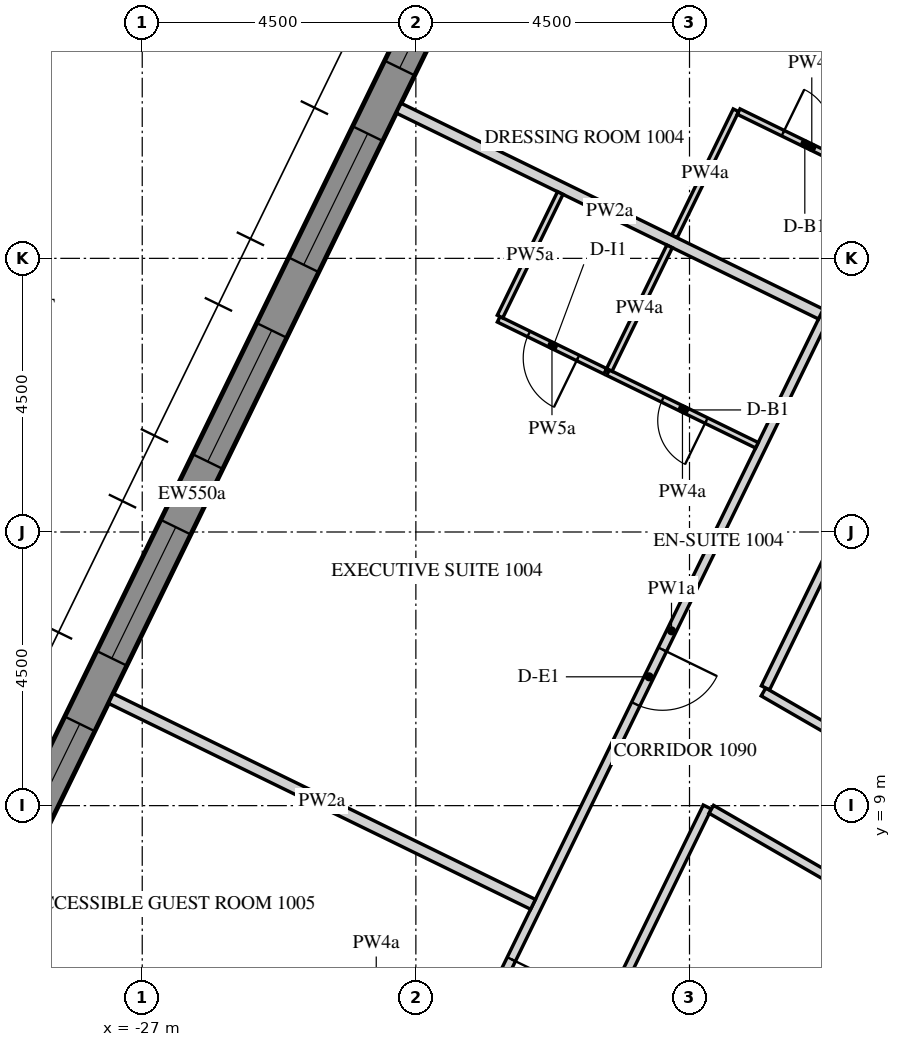
"""IFC4 building model, lengths in metres.
Left out: names, types, materials, properties, quantities, classifications, styles, units other than length and angle.
Written with IfcOpenShell. Run it as: python <this file> out.ifc"""

import sys

from ifc_helpers import new_model, si_unit, direction, frame, frame_2d, origin, place, context, subcontext, project, spatial, polyline, rectangle, outline, extrude, element, fill, save


model = new_model("IFC4")
c1 = context("Model", 3, precision=1e-05, world=origin(), true_north=direction((0.0, 1.0)))
c2 = subcontext(c1, "Body", "Model", "MODEL_VIEW")
j1 = project(units=[si_unit("LENGTHUNIT", "METRE"), si_unit("PLANEANGLEUNIT", "RADIAN")], contexts=[c1])
p1 = place(None, origin())
s1 = spatial("IfcSite", under=j1, at=p1, CompositionType="ELEMENT")
p2 = place(p1, origin())
s2 = spatial("IfcBuilding", under=s1, at=p2, CompositionType="ELEMENT")
p3 = place(p2, frame((0.0, 0.0, 142.8)))
s3 = spatial("IfcBuildingStorey", under=s2, at=p3, CompositionType="ELEMENT", Elevation=142.8)
p4 = place(p3, frame((-19.595, 27.633, -0.15), z_axis=(0.0, 0.0, 1.0), x_axis=(-0.438368285794, -0.898795441694, 0.0)))
e1 = element("IfcWall", 1, at=p4, inside=s3, PredefinedType="SOLIDWALL", context=c2, shape_type="SweptSolid", body=[
    extrude(outline(polyline([(-0.026, -0.275), (30.093, -0.275), (30.048, 0.275), (0.026, 0.275), (-0.026, -0.275)])), origin(), (0.0, 0.0, 1.0), 3.75),
])
p5 = place(p4, frame((1.236, 0.0, 1.05)))
e2 = element("IfcOpeningElement", 2, at=p5, cuts=e1, PredefinedType="OPENING", context=c2, shape_type="SweptSolid", body=[
    extrude(rectangle(XDim=2.4, YDim=2.4, at=frame_2d((1.2, 1.2))), frame((0.0, 0.285, 0.0), z_axis=(0.0, -1.0, 0.0), x_axis=(1.0, 0.0, 0.0)), (0.0, 0.0, 1.0), 0.57),
])
p6 = place(p4, frame((4.835, 0.0, 1.05)))
e3 = element("IfcOpeningElement", 3, at=p6, cuts=e1, PredefinedType="OPENING", context=c2, shape_type="SweptSolid", body=[
    extrude(rectangle(XDim=2.4, YDim=2.4, at=frame_2d((1.2, 1.2))), frame((0.0, 0.285, 0.0), z_axis=(0.0, -1.0, 0.0), x_axis=(1.0, 0.0, 0.0)), (0.0, 0.0, 1.0), 0.57),
])
p7 = place(p4, frame((8.436, 0.0, 1.05)))
e4 = element("IfcOpeningElement", 4, at=p7, cuts=e1, PredefinedType="OPENING", context=c2, shape_type="SweptSolid", body=[
    extrude(rectangle(XDim=2.4, YDim=2.4, at=frame_2d((1.2, 1.2))), frame((0.0, 0.285, 0.0), z_axis=(0.0, -1.0, 0.0), x_axis=(1.0, 0.0, 0.0)), (0.0, 0.0, 1.0), 0.57),
])
p8 = place(p4, frame((12.035, 0.0, 1.05)))
e5 = element("IfcOpeningElement", 5, at=p8, cuts=e1, PredefinedType="OPENING", context=c2, shape_type="SweptSolid", body=[
    extrude(rectangle(XDim=2.4, YDim=2.4, at=frame_2d((1.2, 1.2))), frame((0.0, 0.285, 0.0), z_axis=(0.0, -1.0, 0.0), x_axis=(1.0, 0.0, 0.0)), (0.0, 0.0, 1.0), 0.57),
])
p9 = place(p4, frame((15.635, 0.0, 1.05)))
e6 = element("IfcOpeningElement", 6, at=p9, cuts=e1, PredefinedType="OPENING", context=c2, shape_type="SweptSolid", body=[
    extrude(rectangle(XDim=2.4, YDim=2.4, at=frame_2d((1.2, 1.2))), frame((0.0, 0.285, 0.0), z_axis=(0.0, -1.0, 0.0), x_axis=(1.0, 0.0, 0.0)), (0.0, 0.0, 1.0), 0.57),
])
p10 = place(p4, frame((19.236, 0.0, 1.05)))
e7 = element("IfcOpeningElement", 7, at=p10, cuts=e1, PredefinedType="OPENING", context=c2, shape_type="SweptSolid", body=[
    extrude(rectangle(XDim=2.4, YDim=2.4, at=frame_2d((1.2, 1.2))), frame((0.0, 0.285, 0.0), z_axis=(0.0, -1.0, 0.0), x_axis=(1.0, 0.0, 0.0)), (0.0, 0.0, 1.0), 0.57),
])
p11 = place(p4, frame((22.835, 0.0, 1.05)))
e8 = element("IfcOpeningElement", 8, at=p11, cuts=e1, PredefinedType="OPENING", context=c2, shape_type="SweptSolid", body=[
    extrude(rectangle(XDim=2.4, YDim=2.4, at=frame_2d((1.2, 1.2))), frame((0.0, 0.285, 0.0), z_axis=(0.0, -1.0, 0.0), x_axis=(1.0, 0.0, 0.0)), (0.0, 0.0, 1.0), 0.57),
])
p12 = place(p4, frame((26.436, 0.0, 1.05)))
e9 = element("IfcOpeningElement", 9, at=p12, cuts=e1, PredefinedType="OPENING", context=c2, shape_type="SweptSolid", body=[
    extrude(rectangle(XDim=2.4, YDim=2.4, at=frame_2d((1.2, 1.2))), frame((0.0, 0.285, 0.0), z_axis=(0.0, -1.0, 0.0), x_axis=(1.0, 0.0, 0.0)), (0.0, 0.0, 1.0), 0.57),
])
p13 = place(p3, frame((-7.91, 13.7, -0.15), z_axis=(0.0, 0.0, 1.0), x_axis=(-0.499999880136, -0.866025472988, 0.0)))
e10 = element("IfcWall", 10, at=p13, inside=s3, PredefinedType="SHEAR", context=c2, shape_type="SweptSolid", body=[
    extrude(outline(polyline([(-0.173, -0.3), (15.993, -0.3), (15.646, 0.3), (0.173, 0.3), (-0.173, -0.3)])), origin(), (0.0, 0.0, 1.0), 3.75),
])
p14 = place(p13, frame((7.039, 0.0, 0.15)))
e11 = element("IfcOpeningElement", 11, at=p14, cuts=e10, PredefinedType="OPENING", context=c2, shape_type="SweptSolid", body=[
    extrude(rectangle(XDim=1.8, YDim=2.4, at=frame_2d((0.9, 1.2))), frame((0.0, 0.31, 0.0), z_axis=(0.0, -1.0, 0.0), x_axis=(1.0, 0.0, 0.0)), (0.0, 0.0, 1.0), 0.62),
])
p15 = place(p3, frame((-13.565, 21.575, 0.0), z_axis=(0.0, 0.0, 1.0), x_axis=(-0.438378393111, -0.898790511996, 0.0)))
e12 = element("IfcWall", 12, at=p15, inside=s3, PredefinedType="PARTITIONING", context=c2, shape_type="SweptSolid", body=[
    extrude(rectangle(XDim=21.584, YDim=0.15, at=frame_2d((10.792, 0.0))), origin(), (0.0, 0.0, 1.0), 2.838),
])
p16 = place(p15, frame((0.775, 0.0, 0.0)))
e13 = element("IfcOpeningElement", 13, at=p16, cuts=e12, PredefinedType="OPENING", context=c2, shape_type="SweptSolid", body=[
    extrude(rectangle(XDim=1.0, YDim=2.1, at=frame_2d((0.5, 1.05))), frame((0.0, 0.085, 0.0), z_axis=(0.0, -1.0, 0.0), x_axis=(1.0, 0.0, 0.0)), (0.0, 0.0, 1.0), 0.17),
])
p17 = place(p15, frame((11.134, 0.0, 0.0)))
e14 = element("IfcOpeningElement", 14, at=p17, cuts=e12, PredefinedType="OPENING", context=c2, shape_type="SweptSolid", body=[
    extrude(rectangle(XDim=1.0, YDim=2.1, at=frame_2d((0.5, 1.05))), frame((0.0, 0.085, 0.0), z_axis=(0.0, -1.0, 0.0), x_axis=(1.0, 0.0, 0.0)), (0.0, 0.0, 1.0), 0.17),
])
p18 = place(p15, frame((16.801, 0.0, 0.0)))
e15 = element("IfcOpeningElement", 15, at=p18, cuts=e12, PredefinedType="OPENING", context=c2, shape_type="SweptSolid", body=[
    extrude(rectangle(XDim=1.0, YDim=2.1, at=frame_2d((0.5, 1.05))), frame((0.0, 0.085, 0.0), z_axis=(0.0, -1.0, 0.0), x_axis=(1.0, 0.0, 0.0)), (0.0, 0.0, 1.0), 0.17),
])
p19 = place(p3, frame((-11.614, 7.884, 0.0), z_axis=(0.0, 0.0, 1.0), x_axis=(-0.866017375886, 0.50001390447, 0.0)))
e16 = element("IfcWall", 16, at=p19, inside=s3, PredefinedType="PARTITIONING", context=c2, shape_type="SweptSolid", body=[
    extrude(rectangle(XDim=5.97, YDim=0.15, at=frame_2d((2.985, 0.0))), origin(), (0.0, 0.0, 1.0), 2.838),
])
p20 = place(p3, frame((-16.751, 10.937, 0.0), z_axis=(0.0, 0.0, 1.0), x_axis=(0.438378523504, 0.898790448397, 0.0)))
e17 = element("IfcWall", 17, at=p20, inside=s3, PredefinedType="PARTITIONING", context=c2, shape_type="SweptSolid", body=[
    extrude(rectangle(XDim=9.917, YDim=0.15, at=frame_2d((4.958, 0.0))), origin(), (0.0, 0.0, 1.0), 2.838),
])
p21 = place(p3, frame((-21.885, 0.41, 0.0), z_axis=(0.0, 0.0, 1.0), x_axis=(0.43837064471, 0.898794291179, 0.0)))
e18 = element("IfcWall", 18, at=p21, inside=s3, PredefinedType="PARTITIONING", context=c2, shape_type="SweptSolid", body=[
    extrude(rectangle(XDim=9.532, YDim=0.15, at=frame_2d((4.766, 0.0))), origin(), (0.0, 0.0, 1.0), 2.838),
])
p22 = place(p21, frame((4.316, 0.0, 0.0)))
e19 = element("IfcOpeningElement", 19, at=p22, cuts=e18, PredefinedType="OPENING", context=c2, shape_type="SweptSolid", body=[
    extrude(rectangle(XDim=0.9, YDim=2.1, at=frame_2d((0.45, 1.05))), frame((0.0, 0.085, 0.0), z_axis=(0.0, -1.0, 0.0), x_axis=(1.0, 0.0, 0.0)), (0.0, 0.0, 1.0), 0.17),
])
p23 = place(p3, frame((-17.642, 8.94, 0.0), z_axis=(0.0, 0.0, 1.0), x_axis=(0.866017948234, -0.500012913169, 0.0)))
e20 = element("IfcWall", 20, at=p23, inside=s3, PredefinedType="PARTITIONING", context=c2, shape_type="SweptSolid", body=[
    extrude(rectangle(XDim=5.748, YDim=0.15, at=frame_2d((2.874, 0.0))), origin(), (0.0, 0.0, 1.0), 2.838),
])
p24 = place(p3, frame((-18.249, 18.359, 0.0), z_axis=(0.0, 0.0, 1.0), x_axis=(0.438313261974, 0.898822276303, 0.0)))
e21 = element("IfcWall", 21, at=p24, inside=s3, PredefinedType="PARTITIONING", context=c2, shape_type="SweptSolid", body=[
    extrude(rectangle(XDim=2.31, YDim=0.1, at=frame_2d((1.155, 0.0))), origin(), (0.0, 0.0, 1.0), 2.838),
])
p25 = place(p3, frame((-17.191, 20.413, 0.0), z_axis=(0.0, 0.0, 1.0), x_axis=(0.898800897694, -0.438357099068, 0.0)))
e22 = element("IfcWall", 22, at=p25, inside=s3, PredefinedType="PARTITIONING", context=c2, shape_type="SweptSolid", body=[
    extrude(rectangle(XDim=2.675, YDim=0.1, at=frame_2d((1.337, 0.0))), origin(), (0.0, 0.0, 1.0), 2.838),
])
p26 = place(p25, frame((0.81, 0.0, 0.0)))
e23 = element("IfcOpeningElement", 23, at=p26, cuts=e22, PredefinedType="OPENING", context=c2, shape_type="SweptSolid", body=[
    extrude(rectangle(XDim=0.8, YDim=2.1, at=frame_2d((0.4, 1.05))), frame((0.0, 0.06, 0.0), z_axis=(0.0, -1.0, 0.0), x_axis=(1.0, 0.0, 0.0)), (0.0, 0.0, 1.0), 0.12),
])
p27 = place(p3, frame((-22.782, 20.47, 0.0), z_axis=(0.0, 0.0, 1.0), x_axis=(0.898789402655, -0.438380667542, 0.0)))
e24 = element("IfcWall", 24, at=p27, inside=s3, PredefinedType="PARTITIONING", context=c2, shape_type="SweptSolid", body=[
    extrude(rectangle(XDim=7.725, YDim=0.18, at=frame_2d((3.862, 0.0))), origin(), (0.0, 0.0, 1.0), 2.838),
])
p28 = place(p3, frame((-16.891, 14.926, 0.0), z_axis=(0.0, 0.0, 1.0), x_axis=(-0.898791692788, 0.43837597217, 0.0)))
e25 = element("IfcWall", 25, at=p28, inside=s3, PredefinedType="PARTITIONING", context=c2, shape_type="SweptSolid", body=[
    extrude(rectangle(XDim=2.725, YDim=0.1, at=frame_2d((1.363, 0.0))), origin(), (0.0, 0.0, 1.0), 2.838),
])
p29 = place(p28, frame((0.925, 0.0, 0.0)))
e26 = element("IfcOpeningElement", 26, at=p29, cuts=e25, PredefinedType="OPENING", context=c2, shape_type="SweptSolid", body=[
    extrude(rectangle(XDim=0.8, YDim=2.1, at=frame_2d((0.4, 1.05))), frame((0.0, 0.06, 0.0), z_axis=(0.0, -1.0, 0.0), x_axis=(1.0, 0.0, 0.0)), (0.0, 0.0, 1.0), 0.12),
])
p30 = place(p3, frame((-19.385, 16.143, 0.0), z_axis=(0.0, 0.0, 1.0), x_axis=(-0.898815368173, 0.438327427772, 0.0)))
e27 = element("IfcWall", 27, at=p30, inside=s3, PredefinedType="PARTITIONING", context=c2, shape_type="SweptSolid", body=[
    extrude(rectangle(XDim=1.95, YDim=0.1, at=frame_2d((0.975, 0.0))), origin(), (0.0, 0.0, 1.0), 2.838),
])
p31 = place(p30, frame((0.5, 0.0, 0.0)))
e28 = element("IfcOpeningElement", 28, at=p31, cuts=e27, PredefinedType="OPENING", context=c2, shape_type="SweptSolid", body=[
    extrude(rectangle(XDim=0.9, YDim=2.1, at=frame_2d((0.45, 1.05))), frame((0.0, 0.06, 0.0), z_axis=(0.0, -1.0, 0.0), x_axis=(1.0, 0.0, 0.0)), (0.0, 0.0, 1.0), 0.12),
])
p32 = place(p3, frame((-21.116, 17.042, 0.0), z_axis=(0.0, 0.0, 1.0), x_axis=(0.438334246956, 0.898812042613, 0.0)))
e29 = element("IfcWall", 29, at=p32, inside=s3, PredefinedType="PARTITIONING", context=c2, shape_type="SweptSolid", body=[
    extrude(rectangle(XDim=2.26, YDim=0.1, at=frame_2d((1.13, 0.0))), origin(), (0.0, 0.0, 1.0), 2.838),
])
p33 = place(p3, frame((-27.517, 10.763, 0.0), z_axis=(0.0, 0.0, 1.0), x_axis=(0.898789402655, -0.438380667542, 0.0)))
e30 = element("IfcWall", 30, at=p33, inside=s3, PredefinedType="PARTITIONING", context=c2, shape_type="SweptSolid", body=[
    extrude(rectangle(XDim=7.725, YDim=0.18, at=frame_2d((3.862, 0.0))), origin(), (0.0, 0.0, 1.0), 2.838),
])
p34 = place(p3, frame((-18.328, 18.197, 0.0), z_axis=(0.0, 0.0, 1.0), x_axis=(-0.438376807268, -0.898791285477, 0.0)))
e31 = element("IfcWall", 31, at=p34, inside=s3, PredefinedType="PARTITIONING", context=c2, shape_type="SweptSolid", body=[
    extrude(rectangle(XDim=2.26, YDim=0.1, at=frame_2d((1.13, 0.0))), origin(), (0.0, 0.0, 1.0), 2.838),
])
p35 = place(p6, frame((0.0, 0.205, 0.0)))
e32 = element("IfcWindow", 32, at=p35, inside=s3, PartitioningType="DOUBLE_PANEL_VERTICAL", PredefinedType="WINDOW", context=c2, shape_type="SweptSolid", body=[
    extrude(rectangle(XDim=2.4, YDim=2.4, at=frame_2d((1.2, 1.2))), frame((0.0, 0.03, 0.0), z_axis=(0.0, -1.0, 0.0), x_axis=(1.0, 0.0, 0.0)), (0.0, 0.0, 1.0), 0.06),
])
fill(e3, e32)
p36 = place(p7, frame((0.0, 0.205, 0.0)))
e33 = element("IfcWindow", 33, at=p36, inside=s3, PartitioningType="DOUBLE_PANEL_VERTICAL", PredefinedType="WINDOW", context=c2, shape_type="SweptSolid", body=[
    extrude(rectangle(XDim=2.4, YDim=2.4, at=frame_2d((1.2, 1.2))), frame((0.0, 0.03, 0.0), z_axis=(0.0, -1.0, 0.0), x_axis=(1.0, 0.0, 0.0)), (0.0, 0.0, 1.0), 0.06),
])
fill(e4, e33)
p37 = place(p8, frame((0.0, 0.205, 0.0)))
e34 = element("IfcWindow", 34, at=p37, inside=s3, PartitioningType="DOUBLE_PANEL_VERTICAL", PredefinedType="WINDOW", context=c2, shape_type="SweptSolid", body=[
    extrude(rectangle(XDim=2.4, YDim=2.4, at=frame_2d((1.2, 1.2))), frame((0.0, 0.03, 0.0), z_axis=(0.0, -1.0, 0.0), x_axis=(1.0, 0.0, 0.0)), (0.0, 0.0, 1.0), 0.06),
])
fill(e5, e34)
p38 = place(p9, frame((0.0, 0.205, 0.0)))
e35 = element("IfcWindow", 35, at=p38, inside=s3, PartitioningType="DOUBLE_PANEL_VERTICAL", PredefinedType="WINDOW", context=c2, shape_type="SweptSolid", body=[
    extrude(rectangle(XDim=2.4, YDim=2.4, at=frame_2d((1.2, 1.2))), frame((0.0, 0.03, 0.0), z_axis=(0.0, -1.0, 0.0), x_axis=(1.0, 0.0, 0.0)), (0.0, 0.0, 1.0), 0.06),
])
fill(e6, e35)
p39 = place(p10, frame((0.0, 0.205, 0.0)))
e36 = element("IfcWindow", 36, at=p39, inside=s3, PartitioningType="DOUBLE_PANEL_VERTICAL", PredefinedType="WINDOW", context=c2, shape_type="SweptSolid", body=[
    extrude(rectangle(XDim=2.4, YDim=2.4, at=frame_2d((1.2, 1.2))), frame((0.0, 0.03, 0.0), z_axis=(0.0, -1.0, 0.0), x_axis=(1.0, 0.0, 0.0)), (0.0, 0.0, 1.0), 0.06),
])
fill(e7, e36)
p40 = place(p26, origin())
e37 = element("IfcDoor", 37, at=p40, inside=s3, OperationType="SINGLE_SWING_RIGHT", PredefinedType="DOOR", context=c2, shape_type="SweptSolid", body=[
    extrude(rectangle(XDim=0.8, YDim=2.1, at=frame_2d((0.4, 1.05))), frame((0.0, 0.025, 0.0), z_axis=(0.0, -1.0, 0.0), x_axis=(1.0, 0.0, 0.0)), (0.0, 0.0, 1.0), 0.05),
])
fill(e23, e37)
p41 = place(p17, origin())
e38 = element("IfcDoor", 38, at=p41, inside=s3, OperationType="SINGLE_SWING_LEFT", PredefinedType="DOOR", context=c2, shape_type="SweptSolid", body=[
    extrude(rectangle(XDim=1.0, YDim=2.1, at=frame_2d((0.5, 1.05))), frame((0.0, 0.025, 0.0), z_axis=(0.0, -1.0, 0.0), x_axis=(1.0, 0.0, 0.0)), (0.0, 0.0, 1.0), 0.05),
])
fill(e14, e38)
p42 = place(p29, origin())
e39 = element("IfcDoor", 39, at=p42, inside=s3, OperationType="SINGLE_SWING_RIGHT", PredefinedType="DOOR", context=c2, shape_type="SweptSolid", body=[
    extrude(rectangle(XDim=0.8, YDim=2.1, at=frame_2d((0.4, 1.05))), frame((0.0, 0.025, 0.0), z_axis=(0.0, -1.0, 0.0), x_axis=(1.0, 0.0, 0.0)), (0.0, 0.0, 1.0), 0.05),
])
fill(e26, e39)
p43 = place(p31, origin())
e40 = element("IfcDoor", 40, at=p43, inside=s3, OperationType="SINGLE_SWING_LEFT", PredefinedType="DOOR", context=c2, shape_type="SweptSolid", body=[
    extrude(rectangle(XDim=0.9, YDim=2.1, at=frame_2d((0.45, 1.05))), frame((0.0, 0.025, 0.0), z_axis=(0.0, -1.0, 0.0), x_axis=(1.0, 0.0, 0.0)), (0.0, 0.0, 1.0), 0.05),
])
fill(e28, e40)
p44 = place(p18, origin())
e41 = element("IfcDoor", 41, at=p44, inside=s3, OperationType="SINGLE_SWING_RIGHT", PredefinedType="DOOR", context=c2, shape_type="SweptSolid", body=[
    extrude(rectangle(XDim=1.0, YDim=2.1, at=frame_2d((0.5, 1.05))), frame((0.0, 0.025, 0.0), z_axis=(0.0, -1.0, 0.0), x_axis=(1.0, 0.0, 0.0)), (0.0, 0.0, 1.0), 0.05),
])
fill(e15, e41)
save(model, sys.argv[1])
